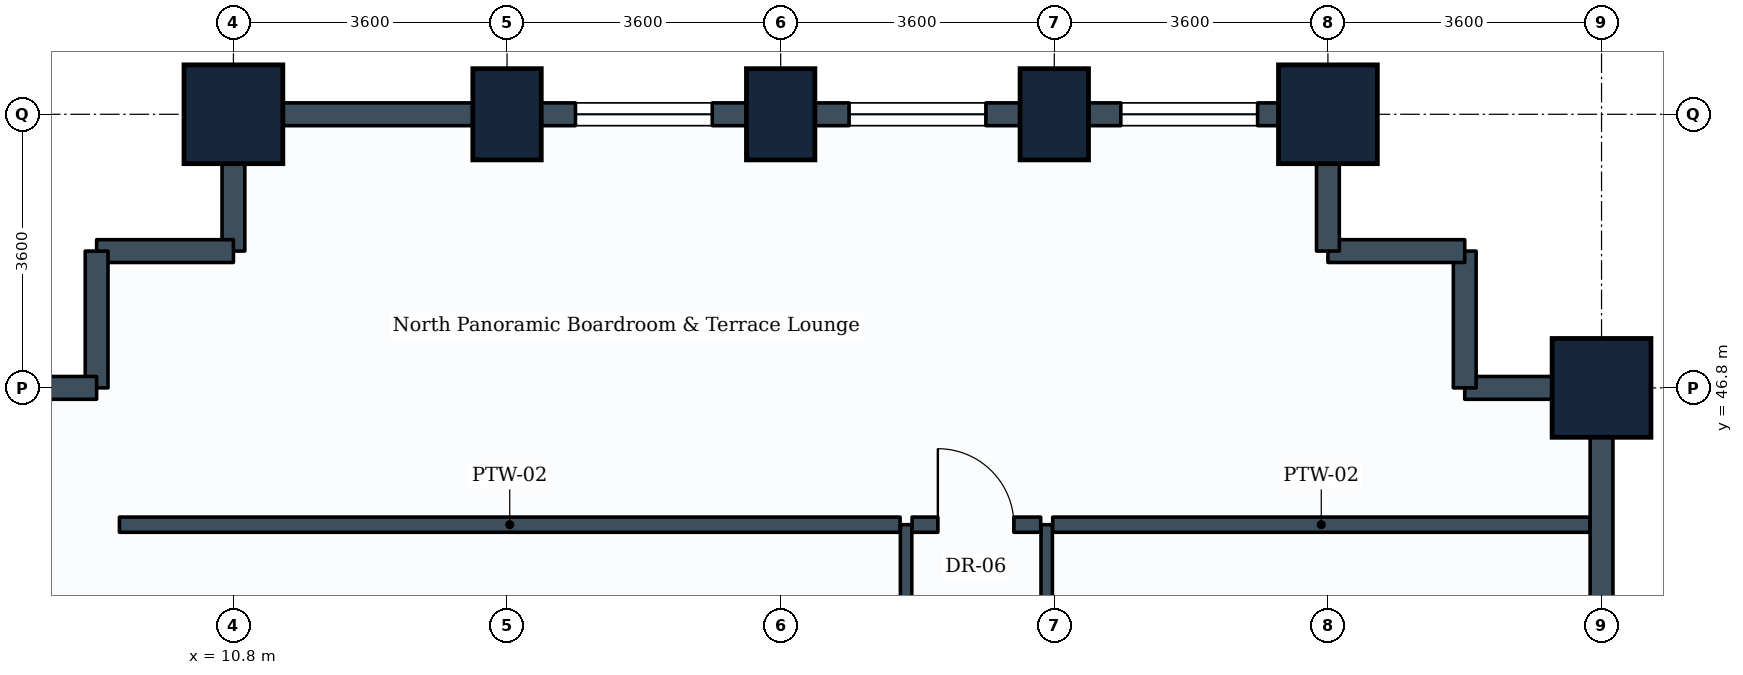
"""IFC4 building model, lengths in metres.
Left out: names, types, materials, properties, quantities, classifications, styles, units other than length and angle.
Written with IfcOpenShell. Run it as: python <this file> out.ifc"""

import sys

from ifc_helpers import new_model, si_unit, direction, frame, frame_2d, origin, origin_2d, place, context, subcontext, project, spatial, rectangle, extrude, element, fill, save


model = new_model("IFC4")
c1 = context("Model", 3, precision=1e-05, world=origin(), true_north=direction((0.0, 1.0)))
c2 = subcontext(c1, "Body", "Model", "MODEL_VIEW")
j1 = project(units=[si_unit("LENGTHUNIT", "METRE"), si_unit("PLANEANGLEUNIT", "RADIAN")], contexts=[c1])
p1 = place(None, origin())
s1 = spatial("IfcSite", under=j1, at=p1, CompositionType="ELEMENT")
p2 = place(p1, origin())
s2 = spatial("IfcBuilding", under=s1, at=p2, CompositionType="ELEMENT")
p3 = place(p2, frame((0.0, 0.0, 47.4)))
s3 = spatial("IfcBuildingStorey", under=s2, at=p3, CompositionType="ELEMENT", Elevation=47.4)
p4 = place(p3, frame((10.8, 50.4, 0.0), z_axis=(0.0, 0.0, 1.0), x_axis=(1.0, 0.0, 0.0)))
e1 = element("IfcColumn", 1, at=p4, inside=s3, PredefinedType="COLUMN", context=c2, shape_type="SweptSolid", body=[
    extrude(rectangle(XDim=1.3, YDim=1.3, at=origin_2d()), origin(), (0.0, 0.0, 1.0), 3.9),
])
for number, where, z_axis, x_axis in (
    (2, (14.4, 50.4, 0.0), (0.0, 0.0, 1.0), (1.0, 0.0, 0.0)),
    (3, (18.0, 50.4, 0.0), (0.0, 0.0, 1.0), (1.0, 0.0, 0.0)),
    (4, (21.6, 50.4, 0.0), (0.0, 0.0, 1.0), (1.0, 0.0, 0.0)),
):
    element("IfcColumn", number, at=place(p3, frame(where, z_axis=z_axis, x_axis=x_axis)), inside=s3, PredefinedType="COLUMN", context=c2, shape_type="SweptSolid", body=[
        extrude(rectangle(XDim=0.9, YDim=1.2, at=origin_2d()), origin(), (0.0, 0.0, 1.0), 3.9),
    ])
for number, where, z_axis, x_axis in (
    (5, (25.2, 50.4, 0.0), (0.0, 0.0, 1.0), (1.0, 0.0, 0.0)),
    (6, (28.8, 46.8, 0.0), (0.0, 0.0, 1.0), (0.0, 1.0, 0.0)),
):
    element("IfcColumn", number, at=place(p3, frame(where, z_axis=z_axis, x_axis=x_axis)), inside=s3, PredefinedType="COLUMN", context=c2, shape_type="SweptSolid", body=[
        extrude(rectangle(XDim=1.3, YDim=1.3, at=origin_2d()), origin(), (0.0, 0.0, 1.0), 3.9),
    ])
p5 = place(p3, frame((28.8, 43.2, 0.0), z_axis=(0.0, 0.0, 1.0), x_axis=(0.0, 1.0, 0.0)))
e7 = element("IfcWall", 7, at=p5, inside=s3, PredefinedType="STANDARD", context=c2, shape_type="SweptSolid", body=[
    extrude(rectangle(XDim=3.6, YDim=0.3, at=frame_2d((1.8, 0.0))), origin(), (0.0, 0.0, 1.0), 2.93),
])
p6 = place(p3, frame((27.0, 46.8, 0.0), z_axis=(0.0, 0.0, 1.0), x_axis=(1.0, 0.0, 0.0)))
e8 = element("IfcWall", 8, at=p6, inside=s3, PredefinedType="STANDARD", context=c2, shape_type="SweptSolid", body=[
    extrude(rectangle(XDim=1.8, YDim=0.3, at=frame_2d((0.9, 0.0))), origin(), (0.0, 0.0, 1.0), 2.93),
])
for number, where, z_axis, x_axis in (
    (9, (27.0, 46.8, 0.0), (0.0, 0.0, 1.0), (0.0, 1.0, 0.0)),
    (10, (25.2, 48.6, 0.0), (0.0, 0.0, 1.0), (1.0, 0.0, 0.0)),
):
    element("IfcWall", number, at=place(p3, frame(where, z_axis=z_axis, x_axis=x_axis)), inside=s3, PredefinedType="STANDARD", context=c2, shape_type="SweptSolid", body=[
        extrude(rectangle(XDim=1.8, YDim=0.3, at=frame_2d((0.9, 0.0))), origin(), (0.0, 0.0, 1.0), 3.635),
    ])
p7 = place(p3, frame((25.2, 48.6, 0.0), z_axis=(0.0, 0.0, 1.0), x_axis=(0.0, 1.0, 0.0)))
e11 = element("IfcWall", 11, at=p7, inside=s3, PredefinedType="STANDARD", context=c2, shape_type="SweptSolid", body=[
    extrude(rectangle(XDim=1.8, YDim=0.3, at=frame_2d((0.9, 0.0))), origin(), (0.0, 0.0, 1.0), 2.93),
])
p8 = place(p3, frame((21.6, 50.4, 0.0), z_axis=(0.0, 0.0, 1.0), x_axis=(1.0, 0.0, 0.0)))
e12 = element("IfcWall", 12, at=p8, inside=s3, PredefinedType="STANDARD", context=c2, shape_type="SweptSolid", body=[
    extrude(rectangle(XDim=3.6, YDim=0.3, at=frame_2d((1.8, 0.0))), origin(), (0.0, 0.0, 1.0), 2.93),
])
p9 = place(p8, frame((0.875, 0.0, 0.85)))
e13 = element("IfcOpeningElement", 13, at=p9, cuts=e12, PredefinedType="OPENING", context=c2, shape_type="SweptSolid", body=[
    extrude(rectangle(XDim=1.8, YDim=1.35, at=frame_2d((0.9, 0.675))), frame((0.0, 0.16, 0.0), z_axis=(0.0, -1.0, 0.0), x_axis=(1.0, 0.0, 0.0)), (0.0, 0.0, 1.0), 0.32),
])
p10 = place(p3, frame((18.0, 50.4, 0.0), z_axis=(0.0, 0.0, 1.0), x_axis=(1.0, 0.0, 0.0)))
e14 = element("IfcWall", 14, at=p10, inside=s3, PredefinedType="STANDARD", context=c2, shape_type="SweptSolid", body=[
    extrude(rectangle(XDim=3.6, YDim=0.3, at=frame_2d((1.8, 0.0))), origin(), (0.0, 0.0, 1.0), 2.93),
])
p11 = place(p10, frame((0.9, 0.0, 0.85)))
e15 = element("IfcOpeningElement", 15, at=p11, cuts=e14, PredefinedType="OPENING", context=c2, shape_type="SweptSolid", body=[
    extrude(rectangle(XDim=1.8, YDim=1.35, at=frame_2d((0.9, 0.675))), frame((0.0, 0.16, 0.0), z_axis=(0.0, -1.0, 0.0), x_axis=(1.0, 0.0, 0.0)), (0.0, 0.0, 1.0), 0.32),
])
p12 = place(p3, frame((14.4, 50.4, 0.0), z_axis=(0.0, 0.0, 1.0), x_axis=(1.0, 0.0, 0.0)))
e16 = element("IfcWall", 16, at=p12, inside=s3, PredefinedType="STANDARD", context=c2, shape_type="SweptSolid", body=[
    extrude(rectangle(XDim=3.6, YDim=0.3, at=frame_2d((1.8, 0.0))), origin(), (0.0, 0.0, 1.0), 2.93),
])
p13 = place(p12, frame((0.9, 0.0, 0.85)))
e17 = element("IfcOpeningElement", 17, at=p13, cuts=e16, PredefinedType="OPENING", context=c2, shape_type="SweptSolid", body=[
    extrude(rectangle(XDim=1.8, YDim=1.35, at=frame_2d((0.9, 0.675))), frame((0.0, 0.16, 0.0), z_axis=(0.0, -1.0, 0.0), x_axis=(1.0, 0.0, 0.0)), (0.0, 0.0, 1.0), 0.32),
])
p14 = place(p3, frame((10.8, 50.4, 0.0), z_axis=(0.0, 0.0, 1.0), x_axis=(1.0, 0.0, 0.0)))
e18 = element("IfcWall", 18, at=p14, inside=s3, PredefinedType="STANDARD", context=c2, shape_type="SweptSolid", body=[
    extrude(rectangle(XDim=3.6, YDim=0.3, at=frame_2d((1.8, 0.0))), origin(), (0.0, 0.0, 1.0), 2.93),
])
p15 = place(p3, frame((10.8, 48.6, 0.0), z_axis=(0.0, 0.0, 1.0), x_axis=(0.0, 1.0, 0.0)))
e19 = element("IfcWall", 19, at=p15, inside=s3, PredefinedType="STANDARD", context=c2, shape_type="SweptSolid", body=[
    extrude(rectangle(XDim=1.8, YDim=0.3, at=frame_2d((0.9, 0.0))), origin(), (0.0, 0.0, 1.0), 2.93),
])
for number, where, z_axis, x_axis in (
    (20, (9.0, 48.6, 0.0), (0.0, 0.0, 1.0), (1.0, 0.0, 0.0)),
    (21, (9.0, 46.8, 0.0), (0.0, 0.0, 1.0), (0.0, 1.0, 0.0)),
):
    element("IfcWall", number, at=place(p3, frame(where, z_axis=z_axis, x_axis=x_axis)), inside=s3, PredefinedType="STANDARD", context=c2, shape_type="SweptSolid", body=[
        extrude(rectangle(XDim=1.8, YDim=0.3, at=frame_2d((0.9, 0.0))), origin(), (0.0, 0.0, 1.0), 3.635),
    ])
p16 = place(p3, frame((7.2, 46.8, 0.0), z_axis=(0.0, 0.0, 1.0), x_axis=(1.0, 0.0, 0.0)))
e22 = element("IfcWall", 22, at=p16, inside=s3, PredefinedType="STANDARD", context=c2, shape_type="SweptSolid", body=[
    extrude(rectangle(XDim=1.8, YDim=0.3, at=frame_2d((0.9, 0.0))), origin(), (0.0, 0.0, 1.0), 2.93),
])
p17 = place(p3, frame((19.65, 34.519, 0.0), z_axis=(0.0, 0.0, 1.0), x_axis=(0.0, 1.0, 0.0)))
e23 = element("IfcWall", 23, at=p17, inside=s3, PredefinedType="PARTITIONING", context=c2, shape_type="SweptSolid", body=[
    extrude(rectangle(XDim=10.481, YDim=0.15, at=frame_2d((5.24, 0.0))), origin(), (0.0, 0.0, 1.0), 3.08),
])
p18 = place(p17, frame((7.767, 0.0, 0.0)))
e24 = element("IfcOpeningElement", 24, at=p18, cuts=e23, PredefinedType="OPENING", context=c2, shape_type="SweptSolid", body=[
    extrude(rectangle(XDim=1.0, YDim=2.1, at=frame_2d((0.5, 1.05))), frame((0.0, 0.085, 0.0), z_axis=(0.0, -1.0, 0.0), x_axis=(1.0, 0.0, 0.0)), (0.0, 0.0, 1.0), 0.17),
])
p19 = place(p3, frame((21.5, 36.339, 0.0), z_axis=(0.0, 0.0, 1.0), x_axis=(0.0, 1.0, 0.0)))
e25 = element("IfcWall", 25, at=p19, inside=s3, PredefinedType="PARTITIONING", context=c2, shape_type="SweptSolid", body=[
    extrude(rectangle(XDim=8.661, YDim=0.15, at=frame_2d((4.331, 0.0))), origin(), (0.0, 0.0, 1.0), 3.03),
])
p20 = place(p19, frame((3.791, 0.0, 0.0)))
e26 = element("IfcOpeningElement", 26, at=p20, cuts=e25, PredefinedType="OPENING", context=c2, shape_type="SweptSolid", body=[
    extrude(rectangle(XDim=1.0, YDim=2.1, at=frame_2d((0.5, 1.05))), frame((0.0, 0.085, 0.0), z_axis=(0.0, -1.0, 0.0), x_axis=(1.0, 0.0, 0.0)), (0.0, 0.0, 1.0), 0.17),
])
p21 = place(p3, frame((9.3, 45.0, 0.0), z_axis=(0.0, 0.0, 1.0), x_axis=(1.0, 0.0, 0.0)))
e27 = element("IfcWall", 27, at=p21, inside=s3, PredefinedType="PARTITIONING", context=c2, shape_type="SweptSolid", body=[
    extrude(rectangle(XDim=10.271, YDim=0.2, at=frame_2d((5.135, 0.0))), origin(), (0.0, 0.0, 1.0), 3.08),
])
p22 = place(p3, frame((21.579, 45.0, 0.0), z_axis=(0.0, 0.0, 1.0), x_axis=(1.0, 0.0, 0.0)))
e28 = element("IfcWall", 28, at=p22, inside=s3, PredefinedType="PARTITIONING", context=c2, shape_type="SweptSolid", body=[
    extrude(rectangle(XDim=7.067, YDim=0.2, at=frame_2d((3.533, 0.0))), origin(), (0.0, 0.0, 1.0), 2.93),
])
p23 = place(p3, frame((19.729, 45.0, 0.0), z_axis=(0.0, 0.0, 1.0), x_axis=(1.0, 0.0, 0.0)))
e29 = element("IfcWall", 29, at=p23, inside=s3, PredefinedType="PARTITIONING", context=c2, shape_type="SweptSolid", body=[
    extrude(rectangle(XDim=1.692, YDim=0.2, at=frame_2d((0.846, 0.0))), origin(), (0.0, 0.0, 1.0), 3.635),
])
p24 = place(p23, frame((0.339, 0.0, 0.0)))
e30 = element("IfcOpeningElement", 30, at=p24, cuts=e29, PredefinedType="OPENING", context=c2, shape_type="SweptSolid", body=[
    extrude(rectangle(XDim=1.0, YDim=2.1, at=frame_2d((0.5, 1.05))), frame((0.0, 0.11, 0.0), z_axis=(0.0, -1.0, 0.0), x_axis=(1.0, 0.0, 0.0)), (0.0, 0.0, 1.0), 0.22),
])
p25 = place(p9, origin())
e31 = element("IfcWindow", 31, at=p25, inside=s3, PartitioningType="SINGLE_PANEL", PredefinedType="WINDOW", context=c2, shape_type="SweptSolid", body=[
    extrude(rectangle(XDim=1.8, YDim=1.35, at=frame_2d((0.9, 0.675))), frame((0.0, 0.03, 0.0), z_axis=(0.0, -1.0, 0.0), x_axis=(1.0, 0.0, 0.0)), (0.0, 0.0, 1.0), 0.06),
])
fill(e13, e31)
p26 = place(p11, origin())
e32 = element("IfcWindow", 32, at=p26, inside=s3, PartitioningType="SINGLE_PANEL", PredefinedType="WINDOW", context=c2, shape_type="SweptSolid", body=[
    extrude(rectangle(XDim=1.8, YDim=1.35, at=frame_2d((0.9, 0.675))), frame((0.0, 0.03, 0.0), z_axis=(0.0, -1.0, 0.0), x_axis=(1.0, 0.0, 0.0)), (0.0, 0.0, 1.0), 0.06),
])
fill(e15, e32)
p27 = place(p13, origin())
e33 = element("IfcWindow", 33, at=p27, inside=s3, PartitioningType="SINGLE_PANEL", PredefinedType="WINDOW", context=c2, shape_type="SweptSolid", body=[
    extrude(rectangle(XDim=1.8, YDim=1.35, at=frame_2d((0.9, 0.675))), frame((0.0, 0.03, 0.0), z_axis=(0.0, -1.0, 0.0), x_axis=(1.0, 0.0, 0.0)), (0.0, 0.0, 1.0), 0.06),
])
fill(e17, e33)
p28 = place(p24, origin())
e34 = element("IfcDoor", 34, at=p28, inside=s3, OperationType="SINGLE_SWING_LEFT", PredefinedType="DOOR", context=c2, shape_type="SweptSolid", body=[
    extrude(rectangle(XDim=1.0, YDim=2.1, at=frame_2d((0.5, 1.05))), frame((0.0, 0.025, 0.0), z_axis=(0.0, -1.0, 0.0), x_axis=(1.0, 0.0, 0.0)), (0.0, 0.0, 1.0), 0.05),
])
fill(e30, e34)
save(model, sys.argv[1])
